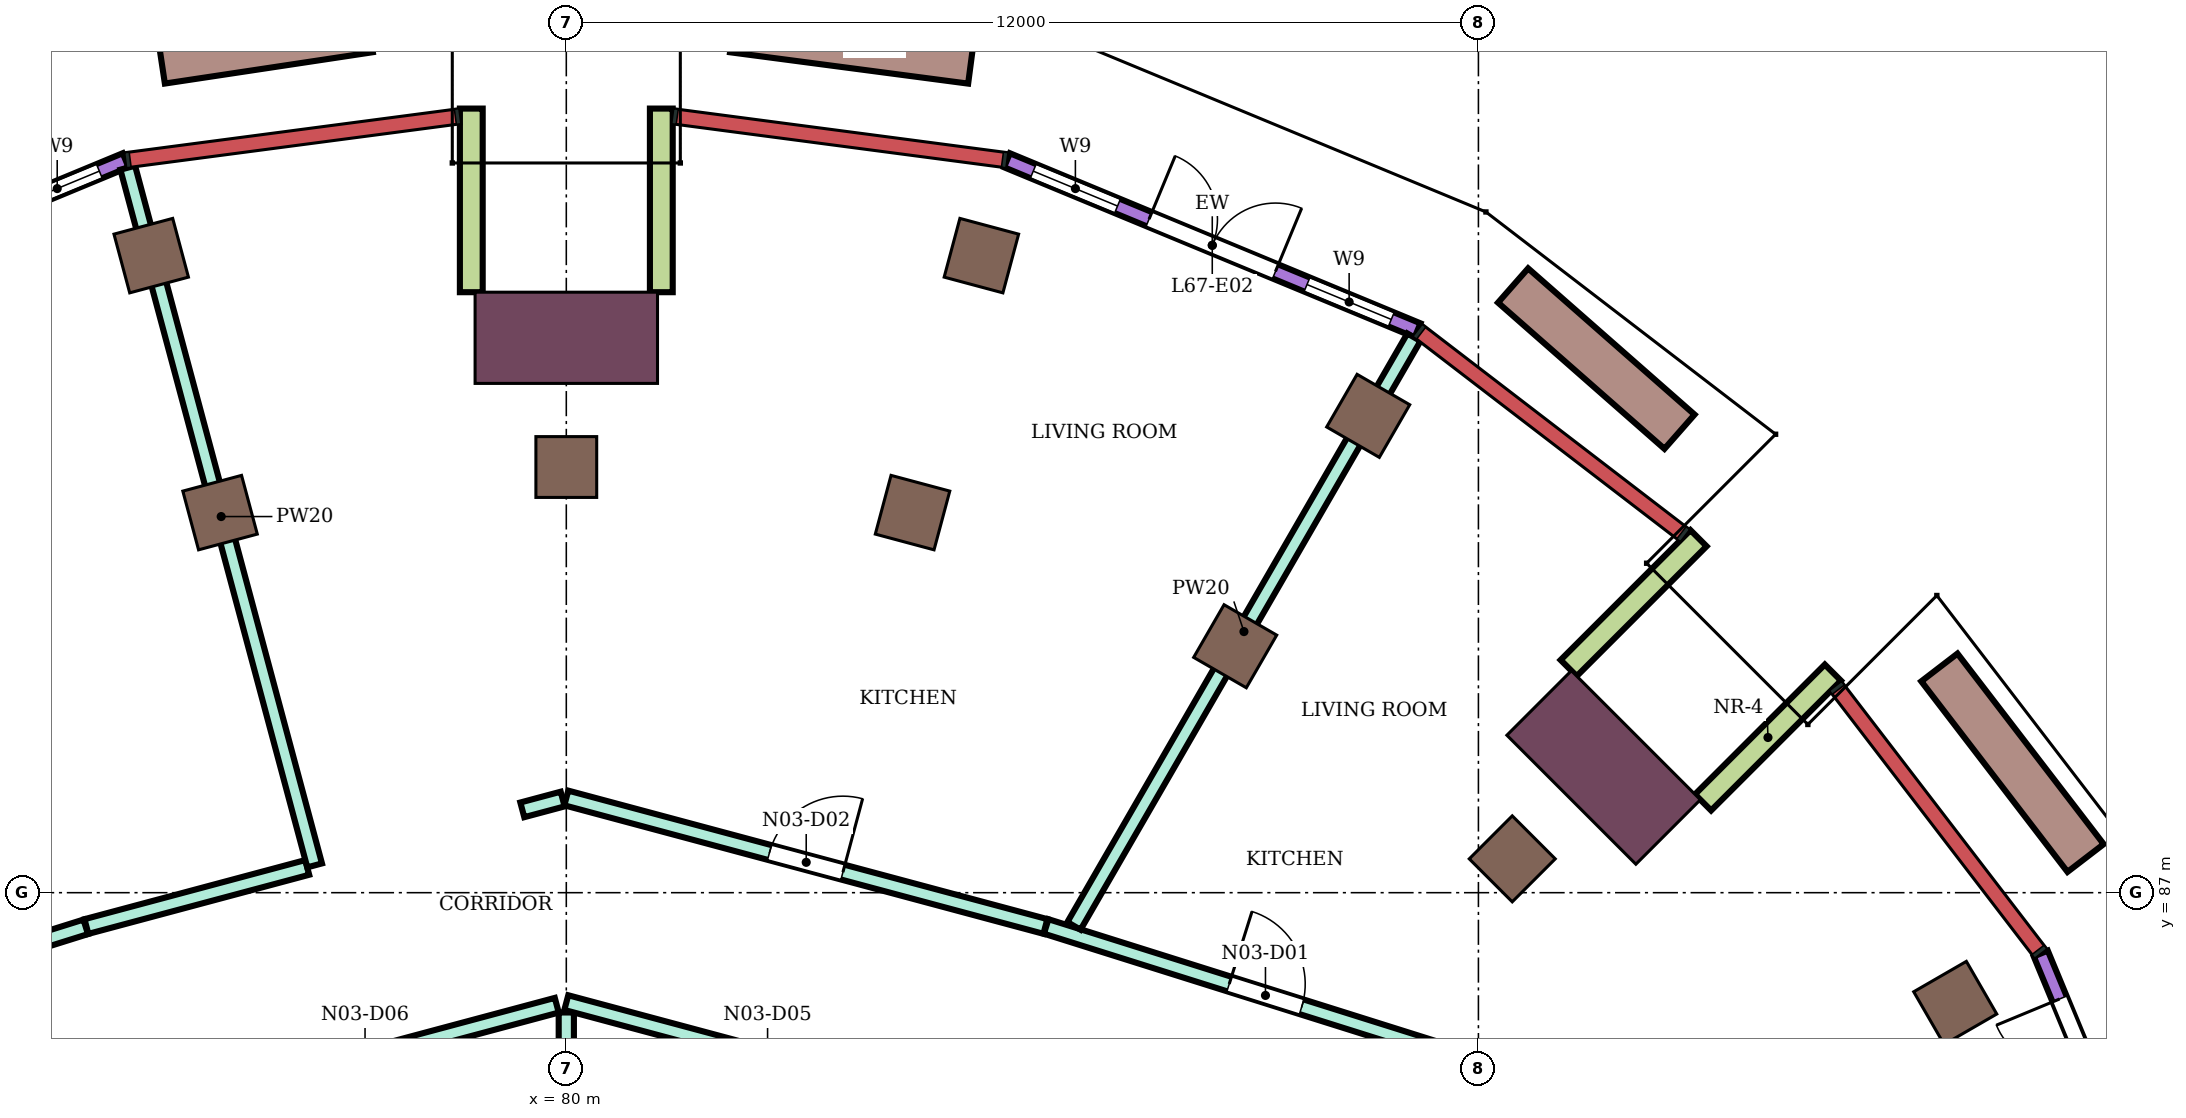
"""IFC4 building model, lengths in metres.
Left out: names, types, materials, properties, quantities, classifications, styles, units other than length and angle.
Written with IfcOpenShell. Run it as: python <this file> out.ifc"""

import sys

from ifc_helpers import new_model, si_unit, direction, frame, frame_2d, origin, origin_2d, place, context, subcontext, project, spatial, rectangle, extrude, element, fill, save


model = new_model("IFC4")
c1 = context("Model", 3, precision=1e-05, world=origin(), true_north=direction((0.0, 1.0)))
c2 = subcontext(c1, "Body", "Model", "MODEL_VIEW")
j1 = project(units=[si_unit("LENGTHUNIT", "METRE"), si_unit("PLANEANGLEUNIT", "RADIAN")], contexts=[c1])
p1 = place(None, origin())
s1 = spatial("IfcSite", under=j1, at=p1, CompositionType="ELEMENT")
p2 = place(p1, origin())
s2 = spatial("IfcBuilding", under=s1, at=p2, CompositionType="ELEMENT")
p3 = place(p2, frame((0.0, 0.0, 292.5)))
s3 = spatial("IfcBuildingStorey", under=s2, at=p3, CompositionType="ELEMENT", Elevation=292.5)
for number, where, z_axis, x_axis in (
    (1, (98.273, 85.55, 0.0), (0.0, 0.0, 1.0), (0.866, 0.5, 0.0)),
    (2, (90.55, 93.273, 0.0), (0.0, 0.0, 1.0), (0.5, 0.866, 0.0)),
    (3, (85.461, 95.381, 0.0), (0.0, 0.0, 1.0), (0.259, 0.966, 0.0)),
    (4, (74.539, 95.381, 0.0), (0.0, 0.0, 1.0), (-0.259, 0.966, 0.0)),
    (5, (92.445, 87.445, 0.0), (0.0, 0.0, 1.0), (0.707, 0.707, 0.0)),
    (6, (88.8, 90.242, 0.0), (0.0, 0.0, 1.0), (0.5, 0.866, 0.0)),
    (7, (84.555, 92.0, 0.0), (0.0, 0.0, 1.0), (0.259, 0.966, 0.0)),
    (8, (80.0, 92.6, 0.0), (0.0, 0.0, 1.0), (0.0, 1.0, 0.0)),
    (9, (75.445, 92.0, 0.0), (0.0, 0.0, 1.0), (-0.259, 0.966, 0.0)),
):
    element("IfcColumn", number, at=place(p3, frame(where, z_axis=z_axis, x_axis=x_axis)), inside=s3, PredefinedType="COLUMN", context=c2, shape_type="SweptSolid", body=[
        extrude(rectangle(XDim=0.8, YDim=0.8, at=origin_2d()), origin(), (0.0, 0.0, 1.0), 4.2),
    ])
for number, where, z_axis, x_axis in (
    (10, (93.647, 88.647, 0.0), (0.0, 0.0, 1.0), (0.707, 0.707, 0.0)),
    (11, (80.0, 94.3, 0.0), (0.0, 0.0, 1.0), (0.0, 1.0, 0.0)),
):
    element("IfcColumn", number, at=place(p3, frame(where, z_axis=z_axis, x_axis=x_axis)), inside=s3, PredefinedType="COLUMN", context=c2, shape_type="SweptSolid", body=[
        extrude(rectangle(XDim=1.2, YDim=2.4, at=origin_2d()), origin(), (0.0, 0.0, 1.0), 4.2),
    ])
p4 = place(p3, frame((101.636, 80.797, 0.0), z_axis=(0.0, 0.0, 1.0), x_axis=(-0.382708254591, 0.923869250418, 0.0)))
e12 = element("IfcWall", 12, at=p4, inside=s3, PredefinedType="NOTDEFINED", context=c2, shape_type="SweptSolid", body=[
    extrude(rectangle(XDim=5.847, YDim=0.2, at=frame_2d((2.924, 0.0))), origin(), (0.0, 0.0, 1.0), 4.2),
])
p5 = place(p4, frame((1.75, 0.0, 0.9)))
e13 = element("IfcOpeningElement", 13, at=p5, cuts=e12, PredefinedType="OPENING", context=c2, shape_type="SweptSolid", body=[
    extrude(rectangle(XDim=1.2, YDim=2.7, at=frame_2d((0.6, 1.35))), frame((0.0, 0.11, 0.0), z_axis=(0.0, -1.0, 0.0), x_axis=(1.0, 0.0, 0.0)), (0.0, 0.0, 1.0), 0.22),
])
p6 = place(p4, frame((3.4, 0.0, 0.0)))
e14 = element("IfcOpeningElement", 14, at=p6, cuts=e12, PredefinedType="OPENING", context=c2, shape_type="SweptSolid", body=[
    extrude(rectangle(XDim=1.8, YDim=2.7, at=frame_2d((0.9, 1.35))), frame((0.0, 0.11, 0.0), z_axis=(0.0, -1.0, 0.0), x_axis=(1.0, 0.0, 0.0)), (0.0, 0.0, 1.0), 0.22),
])
p7 = place(p3, frame((91.199, 94.398, 0.0), z_axis=(0.0, 0.0, 1.0), x_axis=(-0.923869250418, 0.382708254591, 0.0)))
e15 = element("IfcWall", 15, at=p7, inside=s3, PredefinedType="NOTDEFINED", context=c2, shape_type="SweptSolid", body=[
    extrude(rectangle(XDim=5.847, YDim=0.2, at=frame_2d((2.924, 0.0))), origin(), (0.0, 0.0, 1.0), 4.2),
])
p8 = place(p7, frame((0.375, 0.0, 0.9)))
e16 = element("IfcOpeningElement", 16, at=p8, cuts=e15, PredefinedType="OPENING", context=c2, shape_type="SweptSolid", body=[
    extrude(rectangle(XDim=1.2, YDim=2.7, at=frame_2d((0.6, 1.35))), frame((0.0, 0.11, 0.0), z_axis=(0.0, -1.0, 0.0), x_axis=(1.0, 0.0, 0.0)), (0.0, 0.0, 1.0), 0.22),
])
p9 = place(p7, frame((2.024, 0.0, 0.0)))
e17 = element("IfcOpeningElement", 17, at=p9, cuts=e15, PredefinedType="OPENING", context=c2, shape_type="SweptSolid", body=[
    extrude(rectangle(XDim=1.8, YDim=2.7, at=frame_2d((0.9, 1.35))), frame((0.0, 0.11, 0.0), z_axis=(0.0, -1.0, 0.0), x_axis=(1.0, 0.0, 0.0)), (0.0, 0.0, 1.0), 0.22),
])
p10 = place(p7, frame((4.273, 0.0, 0.9)))
e18 = element("IfcOpeningElement", 18, at=p10, cuts=e15, PredefinedType="OPENING", context=c2, shape_type="SweptSolid", body=[
    extrude(rectangle(XDim=1.2, YDim=2.7, at=frame_2d((0.6, 1.35))), frame((0.0, 0.11, 0.0), z_axis=(0.0, -1.0, 0.0), x_axis=(1.0, 0.0, 0.0)), (0.0, 0.0, 1.0), 0.22),
])
p11 = place(p3, frame((74.203, 96.636, 0.0), z_axis=(0.0, 0.0, 1.0), x_axis=(-0.923869250418, -0.382708254591, 0.0)))
e19 = element("IfcWall", 19, at=p11, inside=s3, PredefinedType="NOTDEFINED", context=c2, shape_type="SweptSolid", body=[
    extrude(rectangle(XDim=5.847, YDim=0.2, at=frame_2d((2.924, 0.0))), origin(), (0.0, 0.0, 1.0), 4.2),
])
p12 = place(p11, frame((0.375, 0.0, 0.9)))
e20 = element("IfcOpeningElement", 20, at=p12, cuts=e19, PredefinedType="OPENING", context=c2, shape_type="SweptSolid", body=[
    extrude(rectangle(XDim=1.2, YDim=2.7, at=frame_2d((0.6, 1.35))), frame((0.0, 0.11, 0.0), z_axis=(0.0, -1.0, 0.0), x_axis=(1.0, 0.0, 0.0)), (0.0, 0.0, 1.0), 0.22),
])
p13 = place(p11, frame((2.024, 0.0, 0.0)))
e21 = element("IfcOpeningElement", 21, at=p13, cuts=e19, PredefinedType="OPENING", context=c2, shape_type="SweptSolid", body=[
    extrude(rectangle(XDim=1.8, YDim=2.7, at=frame_2d((0.9, 1.35))), frame((0.0, 0.11, 0.0), z_axis=(0.0, -1.0, 0.0), x_axis=(1.0, 0.0, 0.0)), (0.0, 0.0, 1.0), 0.22),
])
p14 = place(p11, frame((4.273, 0.0, 0.9)))
e22 = element("IfcOpeningElement", 22, at=p14, cuts=e19, PredefinedType="OPENING", context=c2, shape_type="SweptSolid", body=[
    extrude(rectangle(XDim=1.2, YDim=2.7, at=frame_2d((0.6, 1.35))), frame((0.0, 0.11, 0.0), z_axis=(0.0, -1.0, 0.0), x_axis=(1.0, 0.0, 0.0)), (0.0, 0.0, 1.0), 0.22),
])
for number, where, z_axis, x_axis in (
    (23, (94.955, 88.188, 0.0), (0.0, 0.0, 1.0), (0.707, 0.707, 0.0)),
    (24, (93.188, 89.955, 0.0), (0.0, 0.0, 1.0), (0.707, 0.707, 0.0)),
    (25, (81.25, 94.9, 0.0), (0.0, 0.0, 1.0), (0.0, 1.0, 0.0)),
    (26, (78.75, 94.9, 0.0), (0.0, 0.0, 1.0), (0.0, 1.0, 0.0)),
):
    element("IfcWall", number, at=place(p3, frame(where, z_axis=z_axis, x_axis=x_axis)), inside=s3, PredefinedType="NOTDEFINED", context=c2, shape_type="SweptSolid", body=[
        extrude(rectangle(XDim=2.416, YDim=0.3, at=frame_2d((1.208, 0.0))), origin(), (0.0, 0.0, 1.0), 4.2),
    ])
p15 = place(p3, frame((99.988, 87.456, 0.0), z_axis=(0.0, 0.0, 1.0), x_axis=(-0.608765634962, 0.793350112932, 0.0)))
e27 = element("IfcWall", 27, at=p15, inside=s3, PredefinedType="USERDEFINED", context=c2, shape_type="SweptSolid", body=[
    extrude(rectangle(XDim=3.16, YDim=0.6, at=frame_2d((1.58, 0.0))), origin(), (0.0, 0.0, 1.0), 0.6),
])
p16 = place(p3, frame((94.646, 93.064, 0.0), z_axis=(0.0, 0.0, 1.0), x_axis=(-0.751246709205, 0.660021501096, 0.0)))
e28 = element("IfcWall", 28, at=p16, inside=s3, PredefinedType="USERDEFINED", context=c2, shape_type="SweptSolid", body=[
    extrude(rectangle(XDim=2.914, YDim=0.6, at=frame_2d((1.457, 0.0))), origin(), (0.0, 0.0, 1.0), 0.6),
])
p17 = place(p3, frame((85.326, 97.941, 0.0), z_axis=(0.0, 0.0, 1.0), x_axis=(-0.991438509602, 0.130574429647, 0.0)))
e29 = element("IfcWall", 29, at=p17, inside=s3, PredefinedType="USERDEFINED", context=c2, shape_type="SweptSolid", body=[
    extrude(rectangle(XDim=3.16, YDim=0.6, at=frame_2d((1.58, 0.0))), origin(), (0.0, 0.0, 1.0), 0.6),
])
p18 = place(p3, frame((77.41, 98.354, 0.0), z_axis=(0.0, 0.0, 1.0), x_axis=(-0.988820205867, -0.14911271062, 0.0)))
e30 = element("IfcWall", 30, at=p18, inside=s3, PredefinedType="USERDEFINED", context=c2, shape_type="SweptSolid", body=[
    extrude(rectangle(XDim=2.767, YDim=0.6, at=frame_2d((1.384, 0.0))), origin(), (0.0, 0.0, 1.0), 0.6),
])
p19 = place(p3, frame((68.201, 84.833, 0.0), z_axis=(0.0, 0.0, 1.0), x_axis=(0.95420102455, 0.299166182492, 0.0)))
e31 = element("IfcWall", 31, at=p19, inside=s3, PredefinedType="PARTITIONING", context=c2, shape_type="SweptSolid", body=[
    extrude(rectangle(XDim=5.74, YDim=0.2, at=frame_2d((2.87, 0.0))), origin(), (0.0, 0.0, 1.0), 3.75),
])
p20 = place(p19, frame((2.374, 0.0, 0.0)))
e32 = element("IfcOpeningElement", 32, at=p20, cuts=e31, PredefinedType="OPENING", context=c2, shape_type="SweptSolid", body=[
    extrude(rectangle(XDim=1.0, YDim=2.1, at=frame_2d((0.5, 1.05))), frame((0.0, 0.11, 0.0), z_axis=(0.0, -1.0, 0.0), x_axis=(1.0, 0.0, 0.0)), (0.0, 0.0, 1.0), 0.22),
])
p21 = place(p3, frame((73.687, 86.555, 0.0), z_axis=(0.0, 0.0, 1.0), x_axis=(0.965987897826, 0.258587279759, 0.0)))
e33 = element("IfcWall", 33, at=p21, inside=s3, PredefinedType="PARTITIONING", context=c2, shape_type="SweptSolid", body=[
    extrude(rectangle(XDim=3.007, YDim=0.2, at=frame_2d((1.503, 0.0))), origin(), (0.0, 0.0, 1.0), 3.75),
])
p22 = place(p3, frame((74.23, 96.538, 0.0), z_axis=(0.0, 0.0, 1.0), x_axis=(0.258775468547, -0.965937501538, 0.0)))
e34 = element("IfcWall", 34, at=p22, inside=s3, PredefinedType="PARTITIONING", context=c2, shape_type="SweptSolid", body=[
    extrude(rectangle(XDim=9.502, YDim=0.2, at=frame_2d((4.751, 0.0))), origin(), (0.0, 0.0, 1.0), 3.75),
])
p23 = place(p3, frame((74.413, 84.057, 0.0), z_axis=(0.0, 0.0, 1.0), x_axis=(0.965972135939, 0.258646153246, 0.0)))
e35 = element("IfcWall", 35, at=p23, inside=s3, PredefinedType="PARTITIONING", context=c2, shape_type="SweptSolid", body=[
    extrude(rectangle(XDim=5.654, YDim=0.2, at=frame_2d((2.827, 0.0))), origin(), (0.0, 0.0, 1.0), 3.75),
])
p24 = place(p23, frame((2.593, 0.0, 0.0)))
e36 = element("IfcOpeningElement", 36, at=p24, cuts=e35, PredefinedType="OPENING", context=c2, shape_type="SweptSolid", body=[
    extrude(rectangle(XDim=0.9, YDim=2.1, at=frame_2d((0.45, 1.05))), frame((0.0, 0.11, 0.0), z_axis=(0.0, -1.0, 0.0), x_axis=(1.0, 0.0, 0.0)), (0.0, 0.0, 1.0), 0.22),
])
p25 = place(p3, frame((79.421, 88.09, 0.0), z_axis=(0.0, 0.0, 1.0), x_axis=(0.966065016104, 0.258299021793, 0.0)))
e37 = element("IfcWall", 37, at=p25, inside=s3, PredefinedType="PARTITIONING", context=c2, shape_type="SweptSolid", body=[
    extrude(rectangle(XDim=0.549, YDim=0.2, at=frame_2d((0.274, 0.0))), origin(), (0.0, 0.0, 1.0), 3.75),
])
p26 = place(p3, frame((80.0, 82.699, 0.0), z_axis=(0.0, 0.0, 1.0), x_axis=(0.0, 1.0, 0.0)))
e38 = element("IfcWall", 38, at=p26, inside=s3, PredefinedType="PARTITIONING", context=c2, shape_type="SweptSolid", body=[
    extrude(rectangle(XDim=2.725, YDim=0.2, at=frame_2d((1.363, 0.0))), origin(), (0.0, 0.0, 1.0), 3.75),
])
p27 = place(p3, frame((80.0, 85.554, 0.0), z_axis=(0.0, 0.0, 1.0), x_axis=(0.965928989968, -0.258807237802, 0.0)))
e39 = element("IfcWall", 39, at=p27, inside=s3, PredefinedType="PARTITIONING", context=c2, shape_type="SweptSolid", body=[
    extrude(rectangle(XDim=5.774, YDim=0.2, at=frame_2d((2.887, 0.0))), origin(), (0.0, 0.0, 1.0), 3.75),
])
p28 = place(p27, frame((2.292, 0.0, 0.0)))
e40 = element("IfcOpeningElement", 40, at=p28, cuts=e39, PredefinedType="OPENING", context=c2, shape_type="SweptSolid", body=[
    extrude(rectangle(XDim=0.9, YDim=2.1, at=frame_2d((0.45, 1.05))), frame((0.0, 0.11, 0.0), z_axis=(0.0, -1.0, 0.0), x_axis=(1.0, 0.0, 0.0)), (0.0, 0.0, 1.0), 0.22),
])
p29 = place(p3, frame((80.0, 88.246, 0.0), z_axis=(0.0, 0.0, 1.0), x_axis=(0.965856994925, -0.259075790752, 0.0)))
e41 = element("IfcWall", 41, at=p29, inside=s3, PredefinedType="PARTITIONING", context=c2, shape_type="SweptSolid", body=[
    extrude(rectangle(XDim=6.526, YDim=0.2, at=frame_2d((3.263, 0.0))), origin(), (0.0, 0.0, 1.0), 3.75),
])
p30 = place(p29, frame((2.768, 0.0, 0.0)))
e42 = element("IfcOpeningElement", 42, at=p30, cuts=e41, PredefinedType="OPENING", context=c2, shape_type="SweptSolid", body=[
    extrude(rectangle(XDim=1.0, YDim=2.1, at=frame_2d((0.5, 1.05))), frame((0.0, 0.11, 0.0), z_axis=(0.0, -1.0, 0.0), x_axis=(1.0, 0.0, 0.0)), (0.0, 0.0, 1.0), 0.22),
])
p31 = place(p3, frame((86.314, 86.556, 0.0), z_axis=(0.0, 0.0, 1.0), x_axis=(0.953912400139, -0.300085209334, 0.0)))
e43 = element("IfcWall", 43, at=p31, inside=s3, PredefinedType="PARTITIONING", context=c2, shape_type="SweptSolid", body=[
    extrude(rectangle(XDim=5.719, YDim=0.2, at=frame_2d((2.86, 0.0))), origin(), (0.0, 0.0, 1.0), 3.75),
])
p32 = place(p31, frame((2.524, 0.0, 0.0)))
e44 = element("IfcOpeningElement", 44, at=p32, cuts=e43, PredefinedType="OPENING", context=c2, shape_type="SweptSolid", body=[
    extrude(rectangle(XDim=1.0, YDim=2.1, at=frame_2d((0.5, 1.05))), frame((0.0, 0.11, 0.0), z_axis=(0.0, -1.0, 0.0), x_axis=(1.0, 0.0, 0.0)), (0.0, 0.0, 1.0), 0.22),
])
p33 = place(p3, frame((86.679, 86.563, 0.0), z_axis=(0.0, 0.0, 1.0), x_axis=(0.500152516677, 0.865937330331, 0.0)))
e45 = element("IfcWall", 45, at=p33, inside=s3, PredefinedType="PARTITIONING", context=c2, shape_type="SweptSolid", body=[
    extrude(rectangle(XDim=8.943, YDim=0.2, at=frame_2d((4.472, 0.0))), origin(), (0.0, 0.0, 1.0), 3.75),
])
p34 = place(p6, origin())
e46 = element("IfcDoor", 46, at=p34, inside=s3, OperationType="DOUBLE_DOOR_SINGLE_SWING", PredefinedType="DOOR", context=c2, shape_type="SweptSolid", body=[
    extrude(rectangle(XDim=1.8, YDim=2.7, at=frame_2d((0.9, 1.35))), frame((0.0, 0.025, 0.0), z_axis=(0.0, -1.0, 0.0), x_axis=(1.0, 0.0, 0.0)), (0.0, 0.0, 1.0), 0.05),
])
fill(e14, e46)
p35 = place(p8, origin())
e47 = element("IfcWindow", 47, at=p35, inside=s3, PartitioningType="SINGLE_PANEL", PredefinedType="WINDOW", context=c2, shape_type="SweptSolid", body=[
    extrude(rectangle(XDim=1.2, YDim=2.7, at=frame_2d((0.6, 1.35))), frame((0.0, 0.03, 0.0), z_axis=(0.0, -1.0, 0.0), x_axis=(1.0, 0.0, 0.0)), (0.0, 0.0, 1.0), 0.06),
])
fill(e16, e47)
p36 = place(p9, frame((1.8, 0.0, 0.0), z_axis=(0.0, 0.0, 1.0), x_axis=(-1.0, 0.0, 0.0)))
e48 = element("IfcDoor", 48, at=p36, inside=s3, OperationType="DOUBLE_DOOR_SINGLE_SWING", PredefinedType="DOOR", context=c2, shape_type="SweptSolid", body=[
    extrude(rectangle(XDim=1.8, YDim=2.7, at=frame_2d((0.9, 1.35))), frame((0.0, 0.025, 0.0), z_axis=(0.0, -1.0, 0.0), x_axis=(1.0, 0.0, 0.0)), (0.0, 0.0, 1.0), 0.05),
])
fill(e17, e48)
p37 = place(p10, origin())
e49 = element("IfcWindow", 49, at=p37, inside=s3, PartitioningType="SINGLE_PANEL", PredefinedType="WINDOW", context=c2, shape_type="SweptSolid", body=[
    extrude(rectangle(XDim=1.2, YDim=2.7, at=frame_2d((0.6, 1.35))), frame((0.0, 0.03, 0.0), z_axis=(0.0, -1.0, 0.0), x_axis=(1.0, 0.0, 0.0)), (0.0, 0.0, 1.0), 0.06),
])
fill(e18, e49)
p38 = place(p12, origin())
e50 = element("IfcWindow", 50, at=p38, inside=s3, PartitioningType="SINGLE_PANEL", PredefinedType="WINDOW", context=c2, shape_type="SweptSolid", body=[
    extrude(rectangle(XDim=1.2, YDim=2.7, at=frame_2d((0.6, 1.35))), frame((0.0, 0.03, 0.0), z_axis=(0.0, -1.0, 0.0), x_axis=(1.0, 0.0, 0.0)), (0.0, 0.0, 1.0), 0.06),
])
fill(e20, e50)
p39 = place(p32, origin())
e51 = element("IfcDoor", 51, at=p39, inside=s3, OperationType="SINGLE_SWING_LEFT", PredefinedType="DOOR", context=c2, shape_type="SweptSolid", body=[
    extrude(rectangle(XDim=1.0, YDim=2.1, at=frame_2d((0.5, 1.05))), frame((0.0, 0.025, 0.0), z_axis=(0.0, -1.0, 0.0), x_axis=(1.0, 0.0, 0.0)), (0.0, 0.0, 1.0), 0.05),
])
fill(e44, e51)
p40 = place(p30, origin())
e52 = element("IfcDoor", 52, at=p40, inside=s3, OperationType="SINGLE_SWING_RIGHT", PredefinedType="DOOR", context=c2, shape_type="SweptSolid", body=[
    extrude(rectangle(XDim=1.0, YDim=2.1, at=frame_2d((0.5, 1.05))), frame((0.0, 0.025, 0.0), z_axis=(0.0, -1.0, 0.0), x_axis=(1.0, 0.0, 0.0)), (0.0, 0.0, 1.0), 0.05),
])
fill(e42, e52)
save(model, sys.argv[1])
